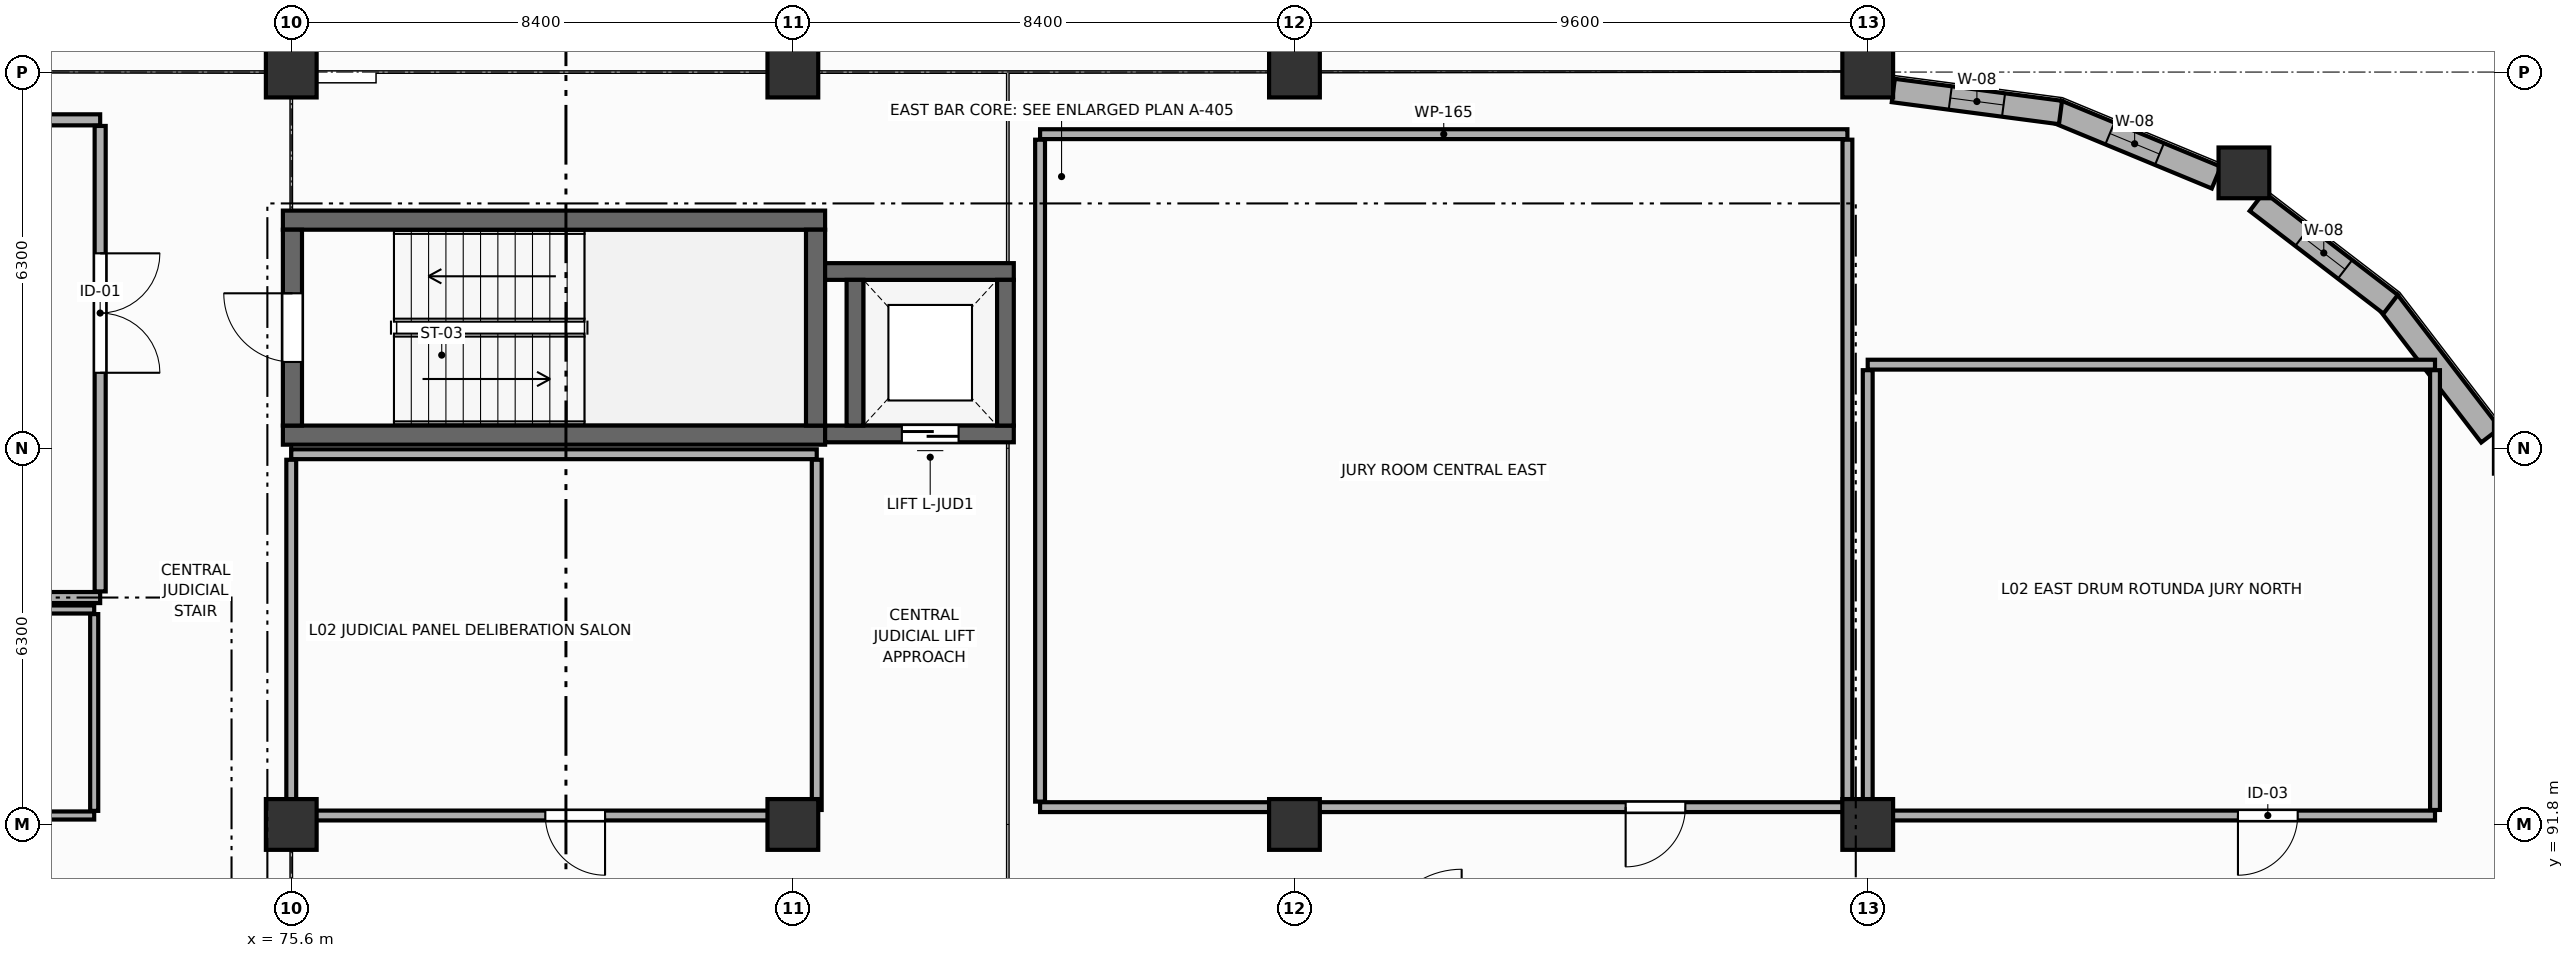
"""IFC4 building model, lengths in metres.
Left out: names, types, materials, properties, quantities, classifications, styles, units other than length and angle.
Written with IfcOpenShell. Run it as: python <this file> out.ifc"""

import sys

from ifc_helpers import new_model, si_unit, direction, frame, frame_2d, origin, origin_2d, place, context, subcontext, project, spatial, rectangle, circle, extrude, element, fill, save


model = new_model("IFC4")
c1 = context("Model", 3, precision=1e-05, world=origin(), true_north=direction((0.0, 1.0)))
c2 = subcontext(c1, "Body", "Model", "MODEL_VIEW")
j1 = project(units=[si_unit("LENGTHUNIT", "METRE"), si_unit("PLANEANGLEUNIT", "RADIAN")], contexts=[c1])
p1 = place(None, origin())
s1 = spatial("IfcSite", under=j1, at=p1, CompositionType="ELEMENT")
p2 = place(p1, origin())
s2 = spatial("IfcBuilding", under=s1, at=p2, CompositionType="ELEMENT")
p3 = place(p2, frame((0.0, 0.0, 5.4)))
s3 = spatial("IfcBuildingStorey", under=s2, at=p3, CompositionType="ELEMENT", Elevation=5.4)
for number, where, z_axis, x_axis in (
    (1, (75.6, 91.8, 0.0), (0.0, 0.0, 1.0), (1.0, 0.0, 0.0)),
    (2, (75.6, 104.4, 0.0), (0.0, 0.0, 1.0), (1.0, 0.0, 0.0)),
    (3, (84.0, 91.8, 0.0), (0.0, 0.0, 1.0), (1.0, 0.0, 0.0)),
    (4, (84.0, 104.4, 0.0), (0.0, 0.0, 1.0), (1.0, 0.0, 0.0)),
    (5, (92.4, 91.8, 0.0), (0.0, 0.0, 1.0), (1.0, 0.0, 0.0)),
    (6, (92.4, 104.4, 0.0), (0.0, 0.0, 1.0), (1.0, 0.0, 0.0)),
    (7, (102.0, 91.8, 0.0), (0.0, 0.0, 1.0), (1.0, 0.0, 0.0)),
    (8, (102.0, 104.4, 0.0), (0.0, 0.0, 1.0), (1.0, 0.0, 0.0)),
):
    element("IfcColumn", number, at=place(p3, frame(where, z_axis=z_axis, x_axis=x_axis)), inside=s3, PredefinedType="COLUMN", context=c2, shape_type="SweptSolid", body=[
        extrude(rectangle(XDim=0.85, YDim=0.85, at=origin_2d()), origin(), (0.0, 0.0, 1.0), 4.5),
    ])
for number, where, z_axis, x_axis in (
    (9, (112.912, 98.1, 0.0), (0.0, 0.0, 1.0), (1.0, 0.0, 0.0)),
    (10, (108.3, 102.712, 0.0), (0.0, 0.0, 1.0), (1.0, 0.0, 0.0)),
):
    element("IfcColumn", number, at=place(p3, frame(where, z_axis=z_axis, x_axis=x_axis)), inside=s3, PredefinedType="COLUMN", context=c2, shape_type="SweptSolid", body=[
        extrude(circle(Radius=0.425, at=origin_2d()), origin(), (0.0, 0.0, 1.0), 4.5),
    ])
p4 = place(p3, frame((112.43, 98.317, 0.0), z_axis=(0.0, 0.0, 1.0), x_axis=(-0.608732750311, 0.793375345407, 0.0)))
e11 = element("IfcWall", 11, at=p4, inside=s3, PredefinedType="ELEMENTEDWALL", context=c2, shape_type="SweptSolid", body=[
    extrude(rectangle(XDim=2.824, YDim=0.395, at=frame_2d((1.412, 0.0))), origin(), (0.0, 0.0, 1.0), 3.37),
])
p5 = place(p3, frame((110.757, 100.511, 0.0), z_axis=(0.0, 0.0, 1.0), x_axis=(-0.793375345407, 0.608732750311, 0.0)))
e12 = element("IfcWall", 12, at=p5, inside=s3, PredefinedType="ELEMENTEDWALL", context=c2, shape_type="SweptSolid", body=[
    extrude(rectangle(XDim=2.824, YDim=0.395, at=frame_2d((1.412, 0.0))), origin(), (0.0, 0.0, 1.0), 3.27),
])
p6 = place(p5, frame((0.962, 0.0, 0.85)))
e13 = element("IfcOpeningElement", 13, at=p6, cuts=e12, PredefinedType="OPENING", context=c2, shape_type="SweptSolid", body=[
    extrude(rectangle(XDim=0.9, YDim=1.85, at=frame_2d((0.45, 0.925))), frame((0.0, 0.208, 0.0), z_axis=(0.0, -1.0, 0.0), x_axis=(1.0, 0.0, 0.0)), (0.0, 0.0, 1.0), 0.415),
])
p7 = place(p3, frame((107.837, 102.633, 0.0), z_axis=(0.0, 0.0, 1.0), x_axis=(-0.923854257916, 0.382744444937, 0.0)))
e14 = element("IfcWall", 14, at=p7, inside=s3, PredefinedType="ELEMENTEDWALL", context=c2, shape_type="SweptSolid", body=[
    extrude(rectangle(XDim=2.892, YDim=0.395, at=frame_2d((1.446, 0.0))), origin(), (0.0, 0.0, 1.0), 3.27),
])
p8 = place(p7, frame((1.03, 0.0, 0.85)))
e15 = element("IfcOpeningElement", 15, at=p8, cuts=e14, PredefinedType="OPENING", context=c2, shape_type="SweptSolid", body=[
    extrude(rectangle(XDim=0.9, YDim=1.85, at=frame_2d((0.45, 0.925))), frame((0.0, 0.208, 0.0), z_axis=(0.0, -1.0, 0.0), x_axis=(1.0, 0.0, 0.0)), (0.0, 0.0, 1.0), 0.415),
])
p9 = place(p3, frame((105.229, 103.723, 0.0), z_axis=(0.0, 0.0, 1.0), x_axis=(-0.991455178228, 0.130447803989, 0.0)))
e16 = element("IfcWall", 16, at=p9, inside=s3, PredefinedType="ELEMENTEDWALL", context=c2, shape_type="SweptSolid", body=[
    extrude(rectangle(XDim=2.824, YDim=0.395, at=frame_2d((1.412, 0.0))), origin(), (0.0, 0.0, 1.0), 3.37),
])
p10 = place(p9, frame((0.962, 0.0, 0.85)))
e17 = element("IfcOpeningElement", 17, at=p10, cuts=e16, PredefinedType="OPENING", context=c2, shape_type="SweptSolid", body=[
    extrude(rectangle(XDim=0.9, YDim=1.85, at=frame_2d((0.45, 0.925))), frame((0.0, 0.208, 0.0), z_axis=(0.0, -1.0, 0.0), x_axis=(1.0, 0.0, 0.0)), (0.0, 0.0, 1.0), 0.415),
])
for number, where, z_axis, x_axis in (
    (18, (75.46, 101.92, 0.0), (0.0, 0.0, 1.0), (1.0, 0.0, 0.0)),
    (19, (84.54, 98.32, 0.0), (0.0, 0.0, 1.0), (-1.0, 0.0, 0.0)),
):
    element("IfcWall", number, at=place(p3, frame(where, z_axis=z_axis, x_axis=x_axis)), inside=s3, PredefinedType="SHEAR", context=c2, shape_type="SweptSolid", body=[
        extrude(rectangle(XDim=9.08, YDim=0.32, at=frame_2d((4.54, 0.0))), origin(), (0.0, 0.0, 1.0), 4.24),
    ])
p11 = place(p3, frame((75.62, 98.48, 0.0), z_axis=(0.0, 0.0, 1.0), x_axis=(0.0, 1.0, 0.0)))
e20 = element("IfcWall", 20, at=p11, inside=s3, PredefinedType="SHEAR", context=c2, shape_type="SweptSolid", body=[
    extrude(rectangle(XDim=3.28, YDim=0.32, at=frame_2d((1.64, 0.0))), origin(), (0.0, 0.0, 1.0), 4.24),
])
p12 = place(p11, frame((1.065, 0.0, 0.0)))
e21 = element("IfcOpeningElement", 21, at=p12, cuts=e20, PredefinedType="OPENING", context=c2, shape_type="SweptSolid", body=[
    extrude(rectangle(XDim=1.15, YDim=2.2, at=frame_2d((0.575, 1.1))), frame((0.0, 0.17, 0.0), z_axis=(0.0, -1.0, 0.0), x_axis=(1.0, 0.0, 0.0)), (0.0, 0.0, 1.0), 0.34),
])
p13 = place(p3, frame((84.38, 101.76, 0.0), z_axis=(0.0, 0.0, 1.0), x_axis=(0.0, -1.0, 0.0)))
e22 = element("IfcWall", 22, at=p13, inside=s3, PredefinedType="SHEAR", context=c2, shape_type="SweptSolid", body=[
    extrude(rectangle(XDim=3.28, YDim=0.32, at=frame_2d((1.64, 0.0))), origin(), (0.0, 0.0, 1.0), 4.24),
])
p14 = place(p3, frame((84.54, 101.06, 0.0), z_axis=(0.0, 0.0, 1.0), x_axis=(1.0, 0.0, 0.0)))
e23 = element("IfcWall", 23, at=p14, inside=s3, PredefinedType="SHEAR", context=c2, shape_type="SweptSolid", body=[
    extrude(rectangle(XDim=3.16, YDim=0.28, at=frame_2d((1.58, 0.0))), origin(), (0.0, 0.0, 1.0), 4.24),
])
p15 = place(p3, frame((87.7, 98.34, 0.0), z_axis=(0.0, 0.0, 1.0), x_axis=(-1.0, 0.0, 0.0)))
e24 = element("IfcWall", 24, at=p15, inside=s3, PredefinedType="SHEAR", context=c2, shape_type="SweptSolid", body=[
    extrude(rectangle(XDim=3.16, YDim=0.28, at=frame_2d((1.58, 0.0))), origin(), (0.0, 0.0, 1.0), 4.24),
])
p16 = place(p15, frame((0.925, 0.0, 0.0)))
e25 = element("IfcOpeningElement", 25, at=p16, cuts=e24, PredefinedType="OPENING", context=c2, shape_type="SweptSolid", body=[
    extrude(rectangle(XDim=0.95, YDim=2.15, at=frame_2d((0.475, 1.075))), frame((0.0, 0.15, 0.0), z_axis=(0.0, -1.0, 0.0), x_axis=(1.0, 0.0, 0.0)), (0.0, 0.0, 1.0), 0.3),
])
for number, where, z_axis, x_axis in (
    (26, (85.04, 98.48, 0.0), (0.0, 0.0, 1.0), (0.0, 1.0, 0.0)),
    (27, (87.56, 100.92, 0.0), (0.0, 0.0, 1.0), (0.0, -1.0, 0.0)),
):
    element("IfcWall", number, at=place(p3, frame(where, z_axis=z_axis, x_axis=x_axis)), inside=s3, PredefinedType="SHEAR", context=c2, shape_type="SweptSolid", body=[
        extrude(rectangle(XDim=2.44, YDim=0.28, at=frame_2d((1.22, 0.0))), origin(), (0.0, 0.0, 1.0), 4.24),
    ])
for number, where, z_axis, x_axis in (
    (28, (59.0, 103.6, 0.0), (0.0, 0.0, 1.0), (1.0, 0.0, 0.0)),
    (29, (72.4, 95.6, 0.0), (0.0, 0.0, 1.0), (-1.0, 0.0, 0.0)),
):
    element("IfcWall", number, at=place(p3, frame(where, z_axis=z_axis, x_axis=x_axis)), inside=s3, PredefinedType="PARTITIONING", context=c2, shape_type="SweptSolid", body=[
        extrude(rectangle(XDim=13.4, YDim=0.185, at=frame_2d((6.7, 0.0))), origin(), (0.0, 0.0, 1.0), 3.37),
    ])
p17 = place(p3, frame((72.4, 103.498, 0.0), z_axis=(0.0, 0.0, 1.0), x_axis=(0.0, -1.0, 0.0)))
e30 = element("IfcWall", 30, at=p17, inside=s3, PredefinedType="PARTITIONING", context=c2, shape_type="SweptSolid", body=[
    extrude(rectangle(XDim=7.795, YDim=0.185, at=frame_2d((3.897, 0.0))), origin(), (0.0, 0.0, 1.0), 3.62),
])
p18 = place(p17, frame((2.133, 0.0, 0.0)))
e31 = element("IfcOpeningElement", 31, at=p18, cuts=e30, PredefinedType="OPENING", context=c2, shape_type="SweptSolid", body=[
    extrude(rectangle(XDim=2.0, YDim=2.5, at=frame_2d((1.0, 1.25))), frame((0.0, 0.103, 0.0), z_axis=(0.0, -1.0, 0.0), x_axis=(1.0, 0.0, 0.0)), (0.0, 0.0, 1.0), 0.205),
])
p19 = place(p3, frame((67.5, 95.4, 0.0), z_axis=(0.0, 0.0, 1.0), x_axis=(1.0, 0.0, 0.0)))
e32 = element("IfcWall", 32, at=p19, inside=s3, PredefinedType="PARTITIONING", context=c2, shape_type="SweptSolid", body=[
    extrude(rectangle(XDim=4.8, YDim=0.135, at=frame_2d((2.4, 0.0))), origin(), (0.0, 0.0, 1.0), 3.37),
])
p20 = place(p3, frame((72.3, 91.95, 0.0), z_axis=(0.0, 0.0, 1.0), x_axis=(-1.0, 0.0, 0.0)))
e33 = element("IfcWall", 33, at=p20, inside=s3, PredefinedType="PARTITIONING", context=c2, shape_type="SweptSolid", body=[
    extrude(rectangle(XDim=4.8, YDim=0.135, at=frame_2d((2.4, 0.0))), origin(), (0.0, 0.0, 1.0), 3.37),
])
p21 = place(p20, frame((1.61, 0.0, 0.0)))
e34 = element("IfcOpeningElement", 34, at=p21, cuts=e33, PredefinedType="OPENING", context=c2, shape_type="SweptSolid", body=[
    extrude(rectangle(XDim=0.95, YDim=2.15, at=frame_2d((0.475, 1.075))), frame((0.0, 0.077, 0.0), z_axis=(0.0, -1.0, 0.0), x_axis=(1.0, 0.0, 0.0)), (0.0, 0.0, 1.0), 0.155),
])
p22 = place(p3, frame((72.3, 95.323, 0.0), z_axis=(0.0, 0.0, 1.0), x_axis=(0.0, -1.0, 0.0)))
e35 = element("IfcWall", 35, at=p22, inside=s3, PredefinedType="PARTITIONING", context=c2, shape_type="SweptSolid", body=[
    extrude(rectangle(XDim=3.295, YDim=0.135, at=frame_2d((1.647, 0.0))), origin(), (0.0, 0.0, 1.0), 3.57),
])
p23 = place(p3, frame((75.6, 98.0, 0.0), z_axis=(0.0, 0.0, 1.0), x_axis=(1.0, 0.0, 0.0)))
e36 = element("IfcWall", 36, at=p23, inside=s3, PredefinedType="PARTITIONING", context=c2, shape_type="SweptSolid", body=[
    extrude(rectangle(XDim=8.8, YDim=0.165, at=frame_2d((4.4, 0.0))), origin(), (0.0, 0.0, 1.0), 3.37),
])
p24 = place(p3, frame((84.4, 91.95, 0.0), z_axis=(0.0, 0.0, 1.0), x_axis=(-1.0, 0.0, 0.0)))
e37 = element("IfcWall", 37, at=p24, inside=s3, PredefinedType="PARTITIONING", context=c2, shape_type="SweptSolid", body=[
    extrude(rectangle(XDim=8.8, YDim=0.165, at=frame_2d((4.4, 0.0))), origin(), (0.0, 0.0, 1.0), 3.37),
])
p25 = place(p24, frame((3.545, 0.0, 0.0)))
e38 = element("IfcOpeningElement", 38, at=p25, cuts=e37, PredefinedType="OPENING", context=c2, shape_type="SweptSolid", body=[
    extrude(rectangle(XDim=1.0, YDim=2.15, at=frame_2d((0.5, 1.075))), frame((0.0, 0.093, 0.0), z_axis=(0.0, -1.0, 0.0), x_axis=(1.0, 0.0, 0.0)), (0.0, 0.0, 1.0), 0.185),
])
for number, where, z_axis, x_axis in (
    (39, (75.6, 92.042, 0.0), (0.0, 0.0, 1.0), (0.0, 1.0, 0.0)),
    (40, (84.4, 97.907, 0.0), (0.0, 0.0, 1.0), (0.0, -1.0, 0.0)),
):
    element("IfcWall", number, at=place(p3, frame(where, z_axis=z_axis, x_axis=x_axis)), inside=s3, PredefinedType="PARTITIONING", context=c2, shape_type="SweptSolid", body=[
        extrude(rectangle(XDim=5.865, YDim=0.165, at=frame_2d((2.933, 0.0))), origin(), (0.0, 0.0, 1.0), 3.37),
    ])
p26 = place(p3, frame((88.14, 103.36, 0.0), z_axis=(0.0, 0.0, 1.0), x_axis=(1.0, 0.0, 0.0)))
e41 = element("IfcWall", 41, at=p26, inside=s3, PredefinedType="PARTITIONING", context=c2, shape_type="SweptSolid", body=[
    extrude(rectangle(XDim=13.52, YDim=0.165, at=frame_2d((6.76, 0.0))), origin(), (0.0, 0.0, 1.0), 3.37),
])
p27 = place(p3, frame((101.66, 92.09, 0.0), z_axis=(0.0, 0.0, 1.0), x_axis=(-1.0, 0.0, 0.0)))
e42 = element("IfcWall", 42, at=p27, inside=s3, PredefinedType="PARTITIONING", context=c2, shape_type="SweptSolid", body=[
    extrude(rectangle(XDim=13.52, YDim=0.165, at=frame_2d((6.76, 0.0))), origin(), (0.0, 0.0, 1.0), 3.37),
])
p28 = place(p27, frame((2.714, 0.0, 0.0)))
e43 = element("IfcOpeningElement", 43, at=p28, cuts=e42, PredefinedType="OPENING", context=c2, shape_type="SweptSolid", body=[
    extrude(rectangle(XDim=1.0, YDim=2.15, at=frame_2d((0.5, 1.075))), frame((0.0, 0.093, 0.0), z_axis=(0.0, -1.0, 0.0), x_axis=(1.0, 0.0, 0.0)), (0.0, 0.0, 1.0), 0.185),
])
p29 = place(p3, frame((88.14, 92.183, 0.0), z_axis=(0.0, 0.0, 1.0), x_axis=(0.0, 1.0, 0.0)))
e44 = element("IfcWall", 44, at=p29, inside=s3, PredefinedType="PARTITIONING", context=c2, shape_type="SweptSolid", body=[
    extrude(rectangle(XDim=11.085, YDim=0.165, at=frame_2d((5.542, 0.0))), origin(), (0.0, 0.0, 1.0), 3.57),
])
p30 = place(p3, frame((101.66, 103.268, 0.0), z_axis=(0.0, 0.0, 1.0), x_axis=(0.0, -1.0, 0.0)))
e45 = element("IfcWall", 45, at=p30, inside=s3, PredefinedType="PARTITIONING", context=c2, shape_type="SweptSolid", body=[
    extrude(rectangle(XDim=11.085, YDim=0.165, at=frame_2d((5.542, 0.0))), origin(), (0.0, 0.0, 1.0), 3.37),
])
p31 = place(p3, frame((102.0, 99.5, 0.0), z_axis=(0.0, 0.0, 1.0), x_axis=(1.0, 0.0, 0.0)))
e46 = element("IfcWall", 46, at=p31, inside=s3, PredefinedType="PARTITIONING", context=c2, shape_type="SweptSolid", body=[
    extrude(rectangle(XDim=9.5, YDim=0.165, at=frame_2d((4.75, 0.0))), origin(), (0.0, 0.0, 1.0), 3.27),
])
p32 = place(p3, frame((111.5, 91.95, 0.0), z_axis=(0.0, 0.0, 1.0), x_axis=(-1.0, 0.0, 0.0)))
e47 = element("IfcWall", 47, at=p32, inside=s3, PredefinedType="PARTITIONING", context=c2, shape_type="SweptSolid", body=[
    extrude(rectangle(XDim=9.5, YDim=0.165, at=frame_2d((4.75, 0.0))), origin(), (0.0, 0.0, 1.0), 3.27),
])
p33 = place(p32, frame((2.3, 0.0, 0.0)))
e48 = element("IfcOpeningElement", 48, at=p33, cuts=e47, PredefinedType="OPENING", context=c2, shape_type="SweptSolid", body=[
    extrude(rectangle(XDim=1.0, YDim=2.15, at=frame_2d((0.5, 1.075))), frame((0.0, 0.093, 0.0), z_axis=(0.0, -1.0, 0.0), x_axis=(1.0, 0.0, 0.0)), (0.0, 0.0, 1.0), 0.185),
])
for number, where, z_axis, x_axis in (
    (49, (102.0, 92.042, 0.0), (0.0, 0.0, 1.0), (0.0, 1.0, 0.0)),
    (50, (111.5, 99.407, 0.0), (0.0, 0.0, 1.0), (0.0, -1.0, 0.0)),
):
    element("IfcWall", number, at=place(p3, frame(where, z_axis=z_axis, x_axis=x_axis)), inside=s3, PredefinedType="PARTITIONING", context=c2, shape_type="SweptSolid", body=[
        extrude(rectangle(XDim=7.365, YDim=0.165, at=frame_2d((3.683, 0.0))), origin(), (0.0, 0.0, 1.0), 3.37),
    ])
p34 = place(p6, origin())
e51 = element("IfcWindow", 51, at=p34, inside=s3, PartitioningType="SINGLE_PANEL", PredefinedType="WINDOW", context=c2, shape_type="SweptSolid", body=[
    extrude(rectangle(XDim=0.9, YDim=1.85, at=frame_2d((0.45, 0.925))), frame((0.0, 0.03, 0.0), z_axis=(0.0, -1.0, 0.0), x_axis=(1.0, 0.0, 0.0)), (0.0, 0.0, 1.0), 0.06),
])
fill(e13, e51)
p35 = place(p8, origin())
e52 = element("IfcWindow", 52, at=p35, inside=s3, PartitioningType="SINGLE_PANEL", PredefinedType="WINDOW", context=c2, shape_type="SweptSolid", body=[
    extrude(rectangle(XDim=0.9, YDim=1.85, at=frame_2d((0.45, 0.925))), frame((0.0, 0.03, 0.0), z_axis=(0.0, -1.0, 0.0), x_axis=(1.0, 0.0, 0.0)), (0.0, 0.0, 1.0), 0.06),
])
fill(e15, e52)
p36 = place(p10, origin())
e53 = element("IfcWindow", 53, at=p36, inside=s3, PartitioningType="SINGLE_PANEL", PredefinedType="WINDOW", context=c2, shape_type="SweptSolid", body=[
    extrude(rectangle(XDim=0.9, YDim=1.85, at=frame_2d((0.45, 0.925))), frame((0.0, 0.03, 0.0), z_axis=(0.0, -1.0, 0.0), x_axis=(1.0, 0.0, 0.0)), (0.0, 0.0, 1.0), 0.06),
])
fill(e17, e53)
p37 = place(p12, origin())
e54 = element("IfcDoor", 54, at=p37, inside=s3, OperationType="SINGLE_SWING_RIGHT", PredefinedType="DOOR", context=c2, shape_type="SweptSolid", body=[
    extrude(rectangle(XDim=1.15, YDim=2.2, at=frame_2d((0.575, 1.1))), frame((0.0, 0.025, 0.0), z_axis=(0.0, -1.0, 0.0), x_axis=(1.0, 0.0, 0.0)), (0.0, 0.0, 1.0), 0.05),
])
fill(e21, e54)
p38 = place(p16, origin())
e55 = element("IfcDoor", 55, at=p38, inside=s3, OperationType="DOUBLE_DOOR_SLIDING", PredefinedType="DOOR", context=c2, shape_type="SweptSolid", body=[
    extrude(rectangle(XDim=0.95, YDim=2.15, at=frame_2d((0.475, 1.075))), frame((0.0, 0.025, 0.0), z_axis=(0.0, -1.0, 0.0), x_axis=(1.0, 0.0, 0.0)), (0.0, 0.0, 1.0), 0.05),
])
fill(e25, e55)
p39 = place(p18, origin())
e56 = element("IfcDoor", 56, at=p39, inside=s3, OperationType="DOUBLE_DOOR_SINGLE_SWING", PredefinedType="DOOR", context=c2, shape_type="SweptSolid", body=[
    extrude(rectangle(XDim=2.0, YDim=2.5, at=frame_2d((1.0, 1.25))), frame((0.0, 0.025, 0.0), z_axis=(0.0, -1.0, 0.0), x_axis=(1.0, 0.0, 0.0)), (0.0, 0.0, 1.0), 0.05),
])
fill(e31, e56)
p40 = place(p25, origin())
e57 = element("IfcDoor", 57, at=p40, inside=s3, OperationType="SINGLE_SWING_LEFT", PredefinedType="DOOR", context=c2, shape_type="SweptSolid", body=[
    extrude(rectangle(XDim=1.0, YDim=2.15, at=frame_2d((0.5, 1.075))), frame((0.0, 0.025, 0.0), z_axis=(0.0, -1.0, 0.0), x_axis=(1.0, 0.0, 0.0)), (0.0, 0.0, 1.0), 0.05),
])
fill(e38, e57)
p41 = place(p28, origin())
e58 = element("IfcDoor", 58, at=p41, inside=s3, OperationType="SINGLE_SWING_RIGHT", PredefinedType="DOOR", context=c2, shape_type="SweptSolid", body=[
    extrude(rectangle(XDim=1.0, YDim=2.15, at=frame_2d((0.5, 1.075))), frame((0.0, 0.025, 0.0), z_axis=(0.0, -1.0, 0.0), x_axis=(1.0, 0.0, 0.0)), (0.0, 0.0, 1.0), 0.05),
])
fill(e43, e58)
p42 = place(p33, origin())
e59 = element("IfcDoor", 59, at=p42, inside=s3, OperationType="SINGLE_SWING_RIGHT", PredefinedType="DOOR", context=c2, shape_type="SweptSolid", body=[
    extrude(rectangle(XDim=1.0, YDim=2.15, at=frame_2d((0.5, 1.075))), frame((0.0, 0.025, 0.0), z_axis=(0.0, -1.0, 0.0), x_axis=(1.0, 0.0, 0.0)), (0.0, 0.0, 1.0), 0.05),
])
fill(e48, e59)
save(model, sys.argv[1])
